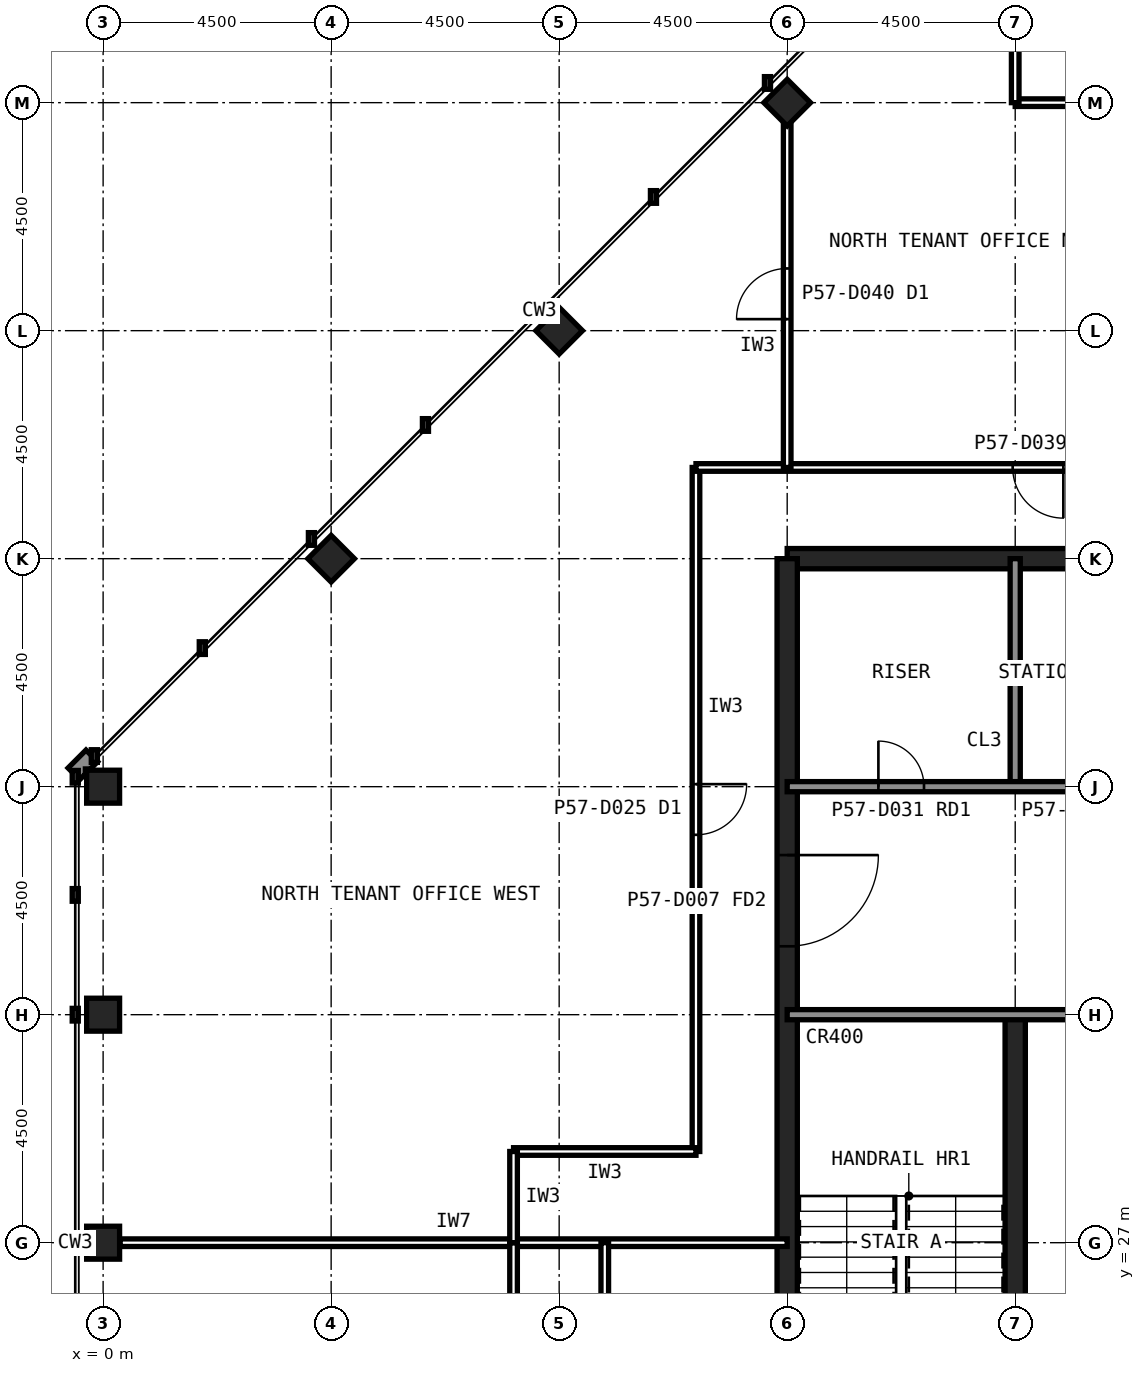
"""IFC4 building model, lengths in metres.
Left out: names, types, materials, properties, quantities, classifications, styles, units other than length and angle.
Written with IfcOpenShell. Run it as: python <this file> out.ifc"""

import sys

from ifc_helpers import new_model, si_unit, direction, frame, frame_2d, origin, origin_2d, place, context, subcontext, project, spatial, rectangle, hollow_rectangle, extrude, element, fill, save


model = new_model("IFC4")
c1 = context("Model", 3, precision=1e-05, world=origin(), true_north=direction((0.0, 1.0)))
c2 = subcontext(c1, "Body", "Model", "MODEL_VIEW")
j1 = project(units=[si_unit("LENGTHUNIT", "METRE"), si_unit("PLANEANGLEUNIT", "RADIAN")], contexts=[c1])
p1 = place(None, origin())
s1 = spatial("IfcSite", under=j1, at=p1, CompositionType="ELEMENT")
p2 = place(p1, origin())
s2 = spatial("IfcBuilding", under=s1, at=p2, CompositionType="ELEMENT")
p3 = place(p2, frame((0.0, 0.0, 238.6)))
s3 = spatial("IfcBuildingStorey", under=s2, at=p3, CompositionType="ELEMENT", Elevation=238.6)
for number, where, z_axis, x_axis in (
    (1, (0.0, 36.0, 0.0), (0.0, 0.0, 1.0), (1.0, 0.0, 0.0)),
    (2, (0.0, 31.5, 0.0), (0.0, 0.0, 1.0), (1.0, 0.0, 0.0)),
    (3, (0.0, 27.0, 0.0), (0.0, 0.0, 1.0), (1.0, 0.0, 0.0)),
    (4, (4.5, 40.5, 0.0), (0.0, 0.0, 1.0), (0.707, 0.707, 0.0)),
    (5, (9.0, 45.0, 0.0), (0.0, 0.0, 1.0), (0.707, 0.707, 0.0)),
    (6, (13.5, 49.5, 0.0), (0.0, 0.0, 1.0), (0.707, 0.707, 0.0)),
):
    element("IfcColumn", number, at=place(p3, frame(where, z_axis=z_axis, x_axis=x_axis)), inside=s3, PredefinedType="COLUMN", context=c2, shape_type="SweptSolid", body=[
        extrude(hollow_rectangle(XDim=0.65, YDim=0.65, WallThickness=0.032, at=origin_2d()), origin(), (0.0, 0.0, 1.0), 4.0),
    ])
p4 = place(p3, frame((40.5, 40.5, 0.0), z_axis=(0.0, 0.0, 1.0), x_axis=(-1.0, 0.0, 0.0)))
e7 = element("IfcWall", 7, at=p4, inside=s3, PredefinedType="SHEAR", context=c2, shape_type="SweptSolid", body=[
    extrude(rectangle(XDim=27.0, YDim=0.4, at=frame_2d((13.5, 0.0))), origin(), (0.0, 0.0, 1.0), 4.0),
])
p5 = place(p3, frame((13.5, 40.5, 0.0), z_axis=(0.0, 0.0, 1.0), x_axis=(0.0, -1.0, 0.0)))
e8 = element("IfcWall", 8, at=p5, inside=s3, PredefinedType="SHEAR", context=c2, shape_type="SweptSolid", body=[
    extrude(rectangle(XDim=27.0, YDim=0.4, at=frame_2d((13.5, 0.0))), origin(), (0.0, 0.0, 1.0), 4.0),
])
p6 = place(p5, frame((19.65, 0.0, 0.0)))
e9 = element("IfcOpeningElement", 9, at=p6, cuts=e8, PredefinedType="OPENING", context=c2, shape_type="SweptSolid", body=[
    extrude(rectangle(XDim=1.2, YDim=2.1, at=frame_2d((0.6, 1.05))), frame((0.0, 0.21, 0.0), z_axis=(0.0, -1.0, 0.0), x_axis=(1.0, 0.0, 0.0)), (0.0, 0.0, 1.0), 0.42),
])
p7 = place(p5, frame((5.85, 0.0, 0.0)))
e10 = element("IfcOpeningElement", 10, at=p7, cuts=e8, PredefinedType="OPENING", context=c2, shape_type="SweptSolid", body=[
    extrude(rectangle(XDim=1.8, YDim=2.1, at=frame_2d((0.9, 1.05))), frame((0.0, 0.21, 0.0), z_axis=(0.0, -1.0, 0.0), x_axis=(1.0, 0.0, 0.0)), (0.0, 0.0, 1.0), 0.42),
])
p8 = place(p3, frame((18.0, 13.5, 0.0), z_axis=(0.0, 0.0, 1.0), x_axis=(0.0, 1.0, 0.0)))
e11 = element("IfcWall", 11, at=p8, inside=s3, PredefinedType="SHEAR", context=c2, shape_type="SweptSolid", body=[
    extrude(rectangle(XDim=18.0, YDim=0.4, at=frame_2d((9.0, 0.0))), origin(), (0.0, 0.0, 1.0), 4.0),
])
p9 = place(p3, frame((18.0, 36.0, 0.0), z_axis=(0.0, 0.0, 1.0), x_axis=(0.0, 1.0, 0.0)))
e12 = element("IfcWall", 12, at=p9, inside=s3, PredefinedType="SOLIDWALL", context=c2, shape_type="SweptSolid", body=[
    extrude(rectangle(XDim=4.5, YDim=0.2, at=frame_2d((2.25, 0.0))), origin(), (0.0, 0.0, 1.0), 3.84),
])
p10 = place(p3, frame((13.5, 36.0, 0.0), z_axis=(0.0, 0.0, 1.0), x_axis=(1.0, 0.0, 0.0)))
e13 = element("IfcWall", 13, at=p10, inside=s3, PredefinedType="SOLIDWALL", context=c2, shape_type="SweptSolid", body=[
    extrude(rectangle(XDim=27.0, YDim=0.2, at=frame_2d((13.5, 0.0))), origin(), (0.0, 0.0, 1.0), 3.84),
])
p11 = place(p10, frame((1.8, 0.0, 0.0)))
e14 = element("IfcOpeningElement", 14, at=p11, cuts=e13, PredefinedType="OPENING", context=c2, shape_type="SweptSolid", body=[
    extrude(rectangle(XDim=0.9, YDim=2.1, at=frame_2d((0.45, 1.05))), frame((0.0, 0.11, 0.0), z_axis=(0.0, -1.0, 0.0), x_axis=(1.0, 0.0, 0.0)), (0.0, 0.0, 1.0), 0.22),
])
p12 = place(p10, frame((5.55, 0.0, 0.0)))
e15 = element("IfcOpeningElement", 15, at=p12, cuts=e13, PredefinedType="OPENING", context=c2, shape_type="SweptSolid", body=[
    extrude(rectangle(XDim=0.9, YDim=2.1, at=frame_2d((0.45, 1.05))), frame((0.0, 0.11, 0.0), z_axis=(0.0, -1.0, 0.0), x_axis=(1.0, 0.0, 0.0)), (0.0, 0.0, 1.0), 0.22),
])
p13 = place(p10, frame((14.55, 0.0, 0.0)))
e16 = element("IfcOpeningElement", 16, at=p13, cuts=e13, PredefinedType="OPENING", context=c2, shape_type="SweptSolid", body=[
    extrude(rectangle(XDim=0.9, YDim=2.1, at=frame_2d((0.45, 1.05))), frame((0.0, 0.11, 0.0), z_axis=(0.0, -1.0, 0.0), x_axis=(1.0, 0.0, 0.0)), (0.0, 0.0, 1.0), 0.22),
])
p14 = place(p10, frame((17.55, 0.0, 0.0)))
e17 = element("IfcOpeningElement", 17, at=p14, cuts=e13, PredefinedType="OPENING", context=c2, shape_type="SweptSolid", body=[
    extrude(rectangle(XDim=0.9, YDim=2.1, at=frame_2d((0.45, 1.05))), frame((0.0, 0.11, 0.0), z_axis=(0.0, -1.0, 0.0), x_axis=(1.0, 0.0, 0.0)), (0.0, 0.0, 1.0), 0.22),
])
p15 = place(p10, frame((20.55, 0.0, 0.0)))
e18 = element("IfcOpeningElement", 18, at=p15, cuts=e13, PredefinedType="OPENING", context=c2, shape_type="SweptSolid", body=[
    extrude(rectangle(XDim=0.9, YDim=2.1, at=frame_2d((0.45, 1.05))), frame((0.0, 0.11, 0.0), z_axis=(0.0, -1.0, 0.0), x_axis=(1.0, 0.0, 0.0)), (0.0, 0.0, 1.0), 0.22),
])
p16 = place(p10, frame((24.1, 0.0, 0.0)))
e19 = element("IfcOpeningElement", 19, at=p16, cuts=e13, PredefinedType="OPENING", context=c2, shape_type="SweptSolid", body=[
    extrude(rectangle(XDim=1.3, YDim=2.2, at=frame_2d((0.65, 1.1))), frame((0.0, 0.11, 0.0), z_axis=(0.0, -1.0, 0.0), x_axis=(1.0, 0.0, 0.0)), (0.0, 0.0, 1.0), 0.22),
])
p17 = place(p3, frame((13.5, 31.5, 0.0), z_axis=(0.0, 0.0, 1.0), x_axis=(1.0, 0.0, 0.0)))
e20 = element("IfcWall", 20, at=p17, inside=s3, PredefinedType="SOLIDWALL", context=c2, shape_type="SweptSolid", body=[
    extrude(rectangle(XDim=27.0, YDim=0.2, at=frame_2d((13.5, 0.0))), origin(), (0.0, 0.0, 1.0), 3.84),
])
p18 = place(p17, frame((24.15, 0.0, 0.0)))
e21 = element("IfcOpeningElement", 21, at=p18, cuts=e20, PredefinedType="OPENING", context=c2, shape_type="SweptSolid", body=[
    extrude(rectangle(XDim=1.2, YDim=2.1, at=frame_2d((0.6, 1.05))), frame((0.0, 0.11, 0.0), z_axis=(0.0, -1.0, 0.0), x_axis=(1.0, 0.0, 0.0)), (0.0, 0.0, 1.0), 0.22),
])
p19 = place(p17, frame((15.3, 0.0, 0.0)))
e22 = element("IfcOpeningElement", 22, at=p19, cuts=e20, PredefinedType="OPENING", context=c2, shape_type="SweptSolid", body=[
    extrude(rectangle(XDim=0.9, YDim=2.1, at=frame_2d((0.45, 1.05))), frame((0.0, 0.11, 0.0), z_axis=(0.0, -1.0, 0.0), x_axis=(1.0, 0.0, 0.0)), (0.0, 0.0, 1.0), 0.22),
])
p20 = place(p17, frame((19.8, 0.0, 0.0)))
e23 = element("IfcOpeningElement", 23, at=p20, cuts=e20, PredefinedType="OPENING", context=c2, shape_type="SweptSolid", body=[
    extrude(rectangle(XDim=0.9, YDim=2.1, at=frame_2d((0.45, 1.05))), frame((0.0, 0.11, 0.0), z_axis=(0.0, -1.0, 0.0), x_axis=(1.0, 0.0, 0.0)), (0.0, 0.0, 1.0), 0.22),
])
p21 = place(p3, frame((0.335, 27.0, 0.0), z_axis=(0.0, 0.0, 1.0), x_axis=(1.0, 0.0, 0.0)))
e24 = element("IfcWall", 24, at=p21, inside=s3, PredefinedType="PARTITIONING", context=c2, shape_type="SweptSolid", body=[
    extrude(rectangle(XDim=13.165, YDim=0.15, at=frame_2d((6.583, 0.0))), origin(), (0.0, 0.0, 1.0), 2.989),
])
p22 = place(p3, frame((8.1, 27.0, 0.0), z_axis=(0.0, 0.0, 1.0), x_axis=(0.0, -1.0, 0.0)))
e25 = element("IfcWall", 25, at=p22, inside=s3, PredefinedType="PARTITIONING", context=c2, shape_type="SweptSolid", body=[
    extrude(rectangle(XDim=6.3, YDim=0.15, at=frame_2d((3.15, 0.0))), origin(), (0.0, 0.0, 1.0), 3.84),
])
p23 = place(p3, frame((11.7, 42.3, 0.0), z_axis=(0.0, 0.0, 1.0), x_axis=(0.0, -1.0, 0.0)))
e26 = element("IfcWall", 26, at=p23, inside=s3, PredefinedType="PARTITIONING", context=c2, shape_type="SweptSolid", body=[
    extrude(rectangle(XDim=13.5, YDim=0.15, at=frame_2d((6.75, 0.0))), origin(), (0.0, 0.0, 1.0), 3.84),
])
p24 = place(p23, frame((6.25, 0.0, 0.0)))
e27 = element("IfcOpeningElement", 27, at=p24, cuts=e26, PredefinedType="OPENING", context=c2, shape_type="SweptSolid", body=[
    extrude(rectangle(XDim=1.0, YDim=2.1, at=frame_2d((0.5, 1.05))), frame((0.0, 0.085, 0.0), z_axis=(0.0, -1.0, 0.0), x_axis=(1.0, 0.0, 0.0)), (0.0, 0.0, 1.0), 0.17),
])
p25 = place(p3, frame((25.2, 42.3, 0.0), z_axis=(0.0, 0.0, 1.0), x_axis=(-1.0, 0.0, 0.0)))
e28 = element("IfcWall", 28, at=p25, inside=s3, PredefinedType="PARTITIONING", context=c2, shape_type="SweptSolid", body=[
    extrude(rectangle(XDim=13.5, YDim=0.15, at=frame_2d((6.75, 0.0))), origin(), (0.0, 0.0, 1.0), 3.84),
])
p26 = place(p25, frame((6.25, 0.0, 0.0)))
e29 = element("IfcOpeningElement", 29, at=p26, cuts=e28, PredefinedType="OPENING", context=c2, shape_type="SweptSolid", body=[
    extrude(rectangle(XDim=1.0, YDim=2.1, at=frame_2d((0.5, 1.05))), frame((0.0, 0.085, 0.0), z_axis=(0.0, -1.0, 0.0), x_axis=(1.0, 0.0, 0.0)), (0.0, 0.0, 1.0), 0.17),
])
p27 = place(p3, frame((11.7, 28.8, 0.0), z_axis=(0.0, 0.0, 1.0), x_axis=(-1.0, 0.0, 0.0)))
e30 = element("IfcWall", 30, at=p27, inside=s3, PredefinedType="PARTITIONING", context=c2, shape_type="SweptSolid", body=[
    extrude(rectangle(XDim=3.6, YDim=0.15, at=frame_2d((1.8, 0.0))), origin(), (0.0, 0.0, 1.0), 3.84),
])
p28 = place(p3, frame((8.1, 28.8, 0.0), z_axis=(0.0, 0.0, 1.0), x_axis=(0.0, -1.0, 0.0)))
e31 = element("IfcWall", 31, at=p28, inside=s3, PredefinedType="PARTITIONING", context=c2, shape_type="SweptSolid", body=[
    extrude(rectangle(XDim=1.8, YDim=0.15, at=frame_2d((0.9, 0.0))), origin(), (0.0, 0.0, 1.0), 3.84),
])
p29 = place(p3, frame((9.9, 27.0, 0.0), z_axis=(0.0, 0.0, 1.0), x_axis=(0.0, -1.0, 0.0)))
e32 = element("IfcWall", 32, at=p29, inside=s3, PredefinedType="PARTITIONING", context=c2, shape_type="SweptSolid", body=[
    extrude(rectangle(XDim=4.5, YDim=0.15, at=frame_2d((2.25, 0.0))), origin(), (0.0, 0.0, 1.0), 3.84),
])
p30 = place(p3, frame((18.0, 49.5, 0.0), z_axis=(0.0, 0.0, 1.0), x_axis=(1.0, 0.0, 0.0)))
e33 = element("IfcWall", 33, at=p30, inside=s3, PredefinedType="PARTITIONING", context=c2, shape_type="SweptSolid", body=[
    extrude(rectangle(XDim=9.0, YDim=0.15, at=frame_2d((4.5, 0.0))), origin(), (0.0, 0.0, 1.0), 3.84),
])
p31 = place(p30, frame((4.0, 0.0, 0.0)))
e34 = element("IfcOpeningElement", 34, at=p31, cuts=e33, PredefinedType="OPENING", context=c2, shape_type="SweptSolid", body=[
    extrude(rectangle(XDim=1.0, YDim=2.1, at=frame_2d((0.5, 1.05))), frame((0.0, 0.085, 0.0), z_axis=(0.0, -1.0, 0.0), x_axis=(1.0, 0.0, 0.0)), (0.0, 0.0, 1.0), 0.17),
])
p32 = place(p3, frame((18.0, 53.665, 0.0), z_axis=(0.0, 0.0, 1.0), x_axis=(0.0, -1.0, 0.0)))
e35 = element("IfcWall", 35, at=p32, inside=s3, PredefinedType="PARTITIONING", context=c2, shape_type="SweptSolid", body=[
    extrude(rectangle(XDim=4.165, YDim=0.15, at=frame_2d((2.083, 0.0))), origin(), (0.0, 0.0, 1.0), 2.989),
])
p33 = place(p3, frame((13.5, 42.3, 0.0), z_axis=(0.0, 0.0, 1.0), x_axis=(0.0, 1.0, 0.0)))
e36 = element("IfcWall", 36, at=p33, inside=s3, PredefinedType="PARTITIONING", context=c2, shape_type="SweptSolid", body=[
    extrude(rectangle(XDim=6.855, YDim=0.15, at=frame_2d((3.427, 0.0))), origin(), (0.0, 0.0, 1.0), 2.989),
])
p34 = place(p33, frame((2.927, 0.0, 0.0)))
e37 = element("IfcOpeningElement", 37, at=p34, cuts=e36, PredefinedType="OPENING", context=c2, shape_type="SweptSolid", body=[
    extrude(rectangle(XDim=1.0, YDim=2.1, at=frame_2d((0.5, 1.05))), frame((0.0, 0.085, 0.0), z_axis=(0.0, -1.0, 0.0), x_axis=(1.0, 0.0, 0.0)), (0.0, 0.0, 1.0), 0.17),
])
p35 = place(p7, origin())
e38 = element("IfcDoor", 38, at=p35, inside=s3, OperationType="SINGLE_SWING_LEFT", PredefinedType="DOOR", context=c2, shape_type="SweptSolid", body=[
    extrude(rectangle(XDim=1.8, YDim=2.1, at=frame_2d((0.9, 1.05))), frame((0.0, 0.025, 0.0), z_axis=(0.0, -1.0, 0.0), x_axis=(1.0, 0.0, 0.0)), (0.0, 0.0, 1.0), 0.05),
])
fill(e10, e38)
p36 = place(p11, origin())
e39 = element("IfcDoor", 39, at=p36, inside=s3, OperationType="SINGLE_SWING_LEFT", PredefinedType="DOOR", context=c2, shape_type="SweptSolid", body=[
    extrude(rectangle(XDim=0.9, YDim=2.1, at=frame_2d((0.45, 1.05))), frame((0.0, 0.025, 0.0), z_axis=(0.0, -1.0, 0.0), x_axis=(1.0, 0.0, 0.0)), (0.0, 0.0, 1.0), 0.05),
])
fill(e14, e39)
p37 = place(p26, origin())
e40 = element("IfcDoor", 40, at=p37, inside=s3, OperationType="SINGLE_SWING_LEFT", PredefinedType="DOOR", context=c2, shape_type="SweptSolid", body=[
    extrude(rectangle(XDim=1.0, YDim=2.1, at=frame_2d((0.5, 1.05))), frame((0.0, 0.025, 0.0), z_axis=(0.0, -1.0, 0.0), x_axis=(1.0, 0.0, 0.0)), (0.0, 0.0, 1.0), 0.05),
])
fill(e29, e40)
p38 = place(p24, origin())
e41 = element("IfcDoor", 41, at=p38, inside=s3, OperationType="SINGLE_SWING_LEFT", PredefinedType="DOOR", context=c2, shape_type="SweptSolid", body=[
    extrude(rectangle(XDim=1.0, YDim=2.1, at=frame_2d((0.5, 1.05))), frame((0.0, 0.025, 0.0), z_axis=(0.0, -1.0, 0.0), x_axis=(1.0, 0.0, 0.0)), (0.0, 0.0, 1.0), 0.05),
])
fill(e27, e41)
p39 = place(p34, origin())
e42 = element("IfcDoor", 42, at=p39, inside=s3, OperationType="SINGLE_SWING_LEFT", PredefinedType="DOOR", context=c2, shape_type="SweptSolid", body=[
    extrude(rectangle(XDim=1.0, YDim=2.1, at=frame_2d((0.5, 1.05))), frame((0.0, 0.025, 0.0), z_axis=(0.0, -1.0, 0.0), x_axis=(1.0, 0.0, 0.0)), (0.0, 0.0, 1.0), 0.05),
])
fill(e37, e42)
save(model, sys.argv[1])
